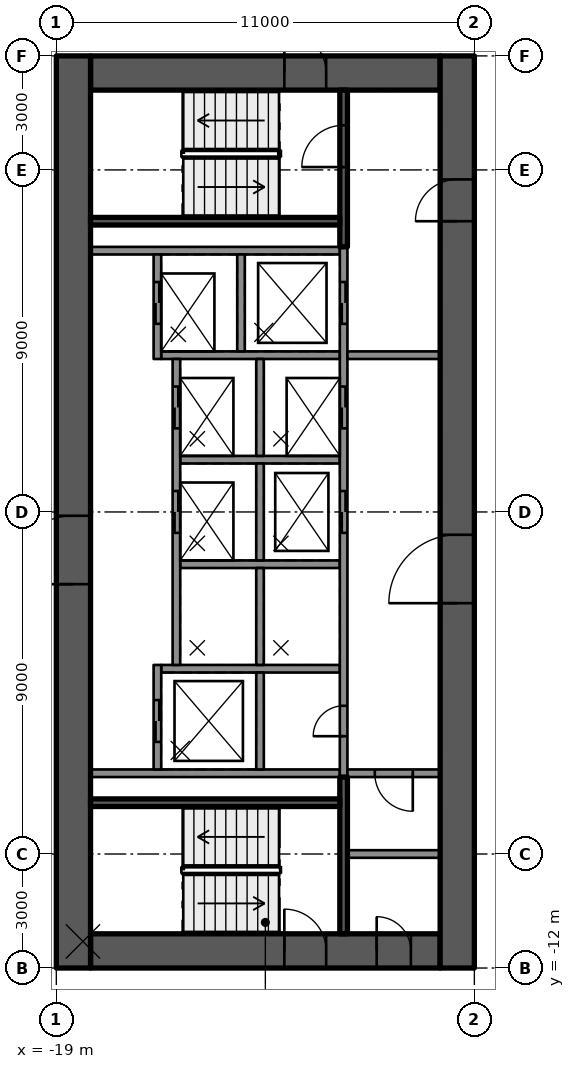
"""IFC4 building model, lengths in metres.
Left out: names, types, materials, properties, quantities, classifications, styles, units other than length and angle.
Written with IfcOpenShell. Run it as: python <this file> out.ifc"""

import sys

from ifc_helpers import new_model, si_unit, direction, frame, frame_2d, origin, place, context, subcontext, project, spatial, rectangle, extrude, element, fill, save


model = new_model("IFC4")
c1 = context("Model", 3, precision=1e-05, world=origin(), true_north=direction((0.0, 1.0)))
c2 = subcontext(c1, "Body", "Model", "MODEL_VIEW")
j1 = project(units=[si_unit("LENGTHUNIT", "METRE"), si_unit("PLANEANGLEUNIT", "RADIAN")], contexts=[c1])
p1 = place(None, origin())
s1 = spatial("IfcSite", under=j1, at=p1, CompositionType="ELEMENT")
p2 = place(p1, origin())
s2 = spatial("IfcBuilding", under=s1, at=p2, CompositionType="ELEMENT")
p3 = place(p2, frame((0.0, 0.0, 105.7)))
s3 = spatial("IfcBuildingStorey", under=s2, at=p3, CompositionType="ELEMENT", Elevation=105.7)
p4 = place(p3, frame((-18.1, 11.55, 0.0), z_axis=(0.0, 0.0, 1.0), x_axis=(1.0, 0.0, 0.0)))
e1 = element("IfcWall", 1, at=p4, inside=s3, PredefinedType="SHEAR", context=c2, shape_type="SweptSolid", body=[
    extrude(rectangle(XDim=9.2, YDim=0.9, at=frame_2d((4.6, 0.0))), origin(), (0.0, 0.0, 1.0), 3.5),
])
p5 = place(p4, frame((5.1, 0.0, 0.0)))
e2 = element("IfcOpeningElement", 2, at=p5, cuts=e1, PredefinedType="OPENING", context=c2, shape_type="SweptSolid", body=[
    extrude(rectangle(XDim=1.1, YDim=2.1, at=frame_2d((0.55, 1.05))), frame((0.0, 0.46, 0.0), z_axis=(0.0, -1.0, 0.0), x_axis=(1.0, 0.0, 0.0)), (0.0, 0.0, 1.0), 0.92),
])
p6 = place(p3, frame((-18.1, -11.55, 0.0), z_axis=(0.0, 0.0, 1.0), x_axis=(1.0, 0.0, 0.0)))
e3 = element("IfcWall", 3, at=p6, inside=s3, PredefinedType="SHEAR", context=c2, shape_type="SweptSolid", body=[
    extrude(rectangle(XDim=9.2, YDim=0.9, at=frame_2d((4.6, 0.0))), origin(), (0.0, 0.0, 1.0), 3.5),
])
p7 = place(p6, frame((5.1, 0.0, 0.0)))
e4 = element("IfcOpeningElement", 4, at=p7, cuts=e3, PredefinedType="OPENING", context=c2, shape_type="SweptSolid", body=[
    extrude(rectangle(XDim=1.1, YDim=2.1, at=frame_2d((0.55, 1.05))), frame((0.0, 0.46, 0.0), z_axis=(0.0, -1.0, 0.0), x_axis=(1.0, 0.0, 0.0)), (0.0, 0.0, 1.0), 0.92),
])
p8 = place(p6, frame((7.53, 0.0, 0.0)))
e5 = element("IfcOpeningElement", 5, at=p8, cuts=e3, PredefinedType="OPENING", context=c2, shape_type="SweptSolid", body=[
    extrude(rectangle(XDim=0.9, YDim=2.1, at=frame_2d((0.45, 1.05))), frame((0.0, 0.46, 0.0), z_axis=(0.0, -1.0, 0.0), x_axis=(1.0, 0.0, 0.0)), (0.0, 0.0, 1.0), 0.92),
])
p9 = place(p3, frame((-18.55, -12.0, 0.0), z_axis=(0.0, 0.0, 1.0), x_axis=(0.0, 1.0, 0.0)))
e6 = element("IfcWall", 6, at=p9, inside=s3, PredefinedType="SHEAR", context=c2, shape_type="SweptSolid", body=[
    extrude(rectangle(XDim=24.0, YDim=0.9, at=frame_2d((12.0, 0.0))), origin(), (0.0, 0.0, 1.0), 3.5),
])
p10 = place(p9, frame((10.1, 0.0, 0.0)))
e7 = element("IfcOpeningElement", 7, at=p10, cuts=e6, PredefinedType="OPENING", context=c2, shape_type="SweptSolid", body=[
    extrude(rectangle(XDim=1.8, YDim=2.1, at=frame_2d((0.9, 1.05))), frame((0.0, 0.46, 0.0), z_axis=(0.0, -1.0, 0.0), x_axis=(1.0, 0.0, 0.0)), (0.0, 0.0, 1.0), 0.92),
])
p11 = place(p3, frame((-8.45, -12.0, 0.0), z_axis=(0.0, 0.0, 1.0), x_axis=(0.0, 1.0, 0.0)))
e8 = element("IfcWall", 8, at=p11, inside=s3, PredefinedType="SHEAR", context=c2, shape_type="SweptSolid", body=[
    extrude(rectangle(XDim=24.0, YDim=0.9, at=frame_2d((12.0, 0.0))), origin(), (0.0, 0.0, 1.0), 3.5),
])
p12 = place(p11, frame((9.6, 0.0, 0.0)))
e9 = element("IfcOpeningElement", 9, at=p12, cuts=e8, PredefinedType="OPENING", context=c2, shape_type="SweptSolid", body=[
    extrude(rectangle(XDim=1.8, YDim=2.1, at=frame_2d((0.9, 1.05))), frame((0.0, 0.46, 0.0), z_axis=(0.0, -1.0, 0.0), x_axis=(1.0, 0.0, 0.0)), (0.0, 0.0, 1.0), 0.92),
])
p13 = place(p11, frame((19.65, 0.0, 0.0)))
e10 = element("IfcOpeningElement", 10, at=p13, cuts=e8, PredefinedType="OPENING", context=c2, shape_type="SweptSolid", body=[
    extrude(rectangle(XDim=1.1, YDim=2.1, at=frame_2d((0.55, 1.05))), frame((0.0, 0.46, 0.0), z_axis=(0.0, -1.0, 0.0), x_axis=(1.0, 0.0, 0.0)), (0.0, 0.0, 1.0), 0.92),
])
for number, where, z_axis, x_axis in (
    (11, (-11.54, 6.875, 0.0), (0.0, 0.0, 1.0), (-1.0, 0.0, 0.0)),
    (12, (-11.54, -6.875, 0.0), (0.0, 0.0, 1.0), (-1.0, 0.0, 0.0)),
):
    element("IfcWall", number, at=place(p3, frame(where, z_axis=z_axis, x_axis=x_axis)), inside=s3, PredefinedType="SOLIDWALL", context=c2, shape_type="SweptSolid", body=[
        extrude(rectangle(XDim=6.56, YDim=0.2, at=frame_2d((3.28, 0.0))), origin(), (0.0, 0.0, 1.0), 3.09),
    ])
p14 = place(p3, frame((-11.54, -4.125, 0.0), z_axis=(0.0, 0.0, 1.0), x_axis=(-1.0, 0.0, 0.0)))
e13 = element("IfcWall", 13, at=p14, inside=s3, PredefinedType="SOLIDWALL", context=c2, shape_type="SweptSolid", body=[
    extrude(rectangle(XDim=4.7, YDim=0.2, at=frame_2d((2.35, 0.0))), origin(), (0.0, 0.0, 1.0), 3.09),
])
for number, where, z_axis, x_axis in (
    (14, (-11.54, -1.375, 0.0), (0.0, 0.0, 1.0), (-1.0, 0.0, 0.0)),
    (15, (-11.54, 1.375, 0.0), (0.0, 0.0, 1.0), (-1.0, 0.0, 0.0)),
):
    element("IfcWall", number, at=place(p3, frame(where, z_axis=z_axis, x_axis=x_axis)), inside=s3, PredefinedType="SOLIDWALL", context=c2, shape_type="SweptSolid", body=[
        extrude(rectangle(XDim=4.2, YDim=0.2, at=frame_2d((2.1, 0.0))), origin(), (0.0, 0.0, 1.0), 3.09),
    ])
p15 = place(p3, frame((-11.54, 4.125, 0.0), z_axis=(0.0, 0.0, 1.0), x_axis=(-1.0, 0.0, 0.0)))
e16 = element("IfcWall", 16, at=p15, inside=s3, PredefinedType="SOLIDWALL", context=c2, shape_type="SweptSolid", body=[
    extrude(rectangle(XDim=4.7, YDim=0.2, at=frame_2d((2.35, 0.0))), origin(), (0.0, 0.0, 1.0), 3.09),
])
p16 = place(p3, frame((-11.44, -6.975, 0.0), z_axis=(0.0, 0.0, 1.0), x_axis=(0.0, 1.0, 0.0)))
e17 = element("IfcWall", 17, at=p16, inside=s3, PredefinedType="SOLIDWALL", context=c2, shape_type="SweptSolid", body=[
    extrude(rectangle(XDim=13.95, YDim=0.2, at=frame_2d((6.975, 0.0))), origin(), (0.0, 0.0, 1.0), 3.09),
])
p17 = place(p16, frame((6.425, 0.0, 0.0)))
e18 = element("IfcOpeningElement", 18, at=p17, cuts=e17, PredefinedType="OPENING", context=c2, shape_type="SweptSolid", body=[
    extrude(rectangle(XDim=1.1, YDim=2.1, at=frame_2d((0.55, 1.05))), frame((0.0, 0.11, 0.0), z_axis=(0.0, -1.0, 0.0), x_axis=(1.0, 0.0, 0.0)), (0.0, 0.0, 1.0), 0.22),
])
p18 = place(p16, frame((9.175, 0.0, 0.0)))
e19 = element("IfcOpeningElement", 19, at=p18, cuts=e17, PredefinedType="OPENING", context=c2, shape_type="SweptSolid", body=[
    extrude(rectangle(XDim=1.1, YDim=2.1, at=frame_2d((0.55, 1.05))), frame((0.0, 0.11, 0.0), z_axis=(0.0, -1.0, 0.0), x_axis=(1.0, 0.0, 0.0)), (0.0, 0.0, 1.0), 0.22),
])
p19 = place(p16, frame((11.925, 0.0, 0.0)))
e20 = element("IfcOpeningElement", 20, at=p19, cuts=e17, PredefinedType="OPENING", context=c2, shape_type="SweptSolid", body=[
    extrude(rectangle(XDim=1.1, YDim=2.1, at=frame_2d((0.55, 1.05))), frame((0.0, 0.11, 0.0), z_axis=(0.0, -1.0, 0.0), x_axis=(1.0, 0.0, 0.0)), (0.0, 0.0, 1.0), 0.22),
])
p20 = place(p16, frame((1.075, 0.0, 0.0)))
e21 = element("IfcOpeningElement", 21, at=p20, cuts=e17, PredefinedType="OPENING", context=c2, shape_type="SweptSolid", body=[
    extrude(rectangle(XDim=0.8, YDim=2.1, at=frame_2d((0.4, 1.05))), frame((0.0, 0.11, 0.0), z_axis=(0.0, -1.0, 0.0), x_axis=(1.0, 0.0, 0.0)), (0.0, 0.0, 1.0), 0.22),
])
for number, where, z_axis, x_axis in (
    (22, (-13.64, -6.775, 0.0), (0.0, 0.0, 1.0), (0.0, 1.0, 0.0)),
    (23, (-13.64, -4.025, 0.0), (0.0, 0.0, 1.0), (0.0, 1.0, 0.0)),
    (24, (-13.64, -1.275, 0.0), (0.0, 0.0, 1.0), (0.0, 1.0, 0.0)),
    (25, (-13.64, 1.475, 0.0), (0.0, 0.0, 1.0), (0.0, 1.0, 0.0)),
    (26, (-14.14, 4.225, 0.0), (0.0, 0.0, 1.0), (0.0, 1.0, 0.0)),
):
    element("IfcWall", number, at=place(p3, frame(where, z_axis=z_axis, x_axis=x_axis)), inside=s3, PredefinedType="SOLIDWALL", context=c2, shape_type="SweptSolid", body=[
        extrude(rectangle(XDim=2.55, YDim=0.2, at=frame_2d((1.275, 0.0))), origin(), (0.0, 0.0, 1.0), 3.09),
    ])
p21 = place(p3, frame((-16.34, -6.775, 0.0), z_axis=(0.0, 0.0, 1.0), x_axis=(0.0, 1.0, 0.0)))
e27 = element("IfcWall", 27, at=p21, inside=s3, PredefinedType="SOLIDWALL", context=c2, shape_type="SweptSolid", body=[
    extrude(rectangle(XDim=2.75, YDim=0.2, at=frame_2d((1.375, 0.0))), origin(), (0.0, 0.0, 1.0), 3.09),
])
p22 = place(p21, frame((0.725, 0.0, 0.0)))
e28 = element("IfcOpeningElement", 28, at=p22, cuts=e27, PredefinedType="OPENING", context=c2, shape_type="SweptSolid", body=[
    extrude(rectangle(XDim=1.1, YDim=2.1, at=frame_2d((0.55, 1.05))), frame((0.0, 0.11, 0.0), z_axis=(0.0, -1.0, 0.0), x_axis=(1.0, 0.0, 0.0)), (0.0, 0.0, 1.0), 0.22),
])
p23 = place(p3, frame((-15.84, -4.025, 0.0), z_axis=(0.0, 0.0, 1.0), x_axis=(0.0, 1.0, 0.0)))
e29 = element("IfcWall", 29, at=p23, inside=s3, PredefinedType="SOLIDWALL", context=c2, shape_type="SweptSolid", body=[
    extrude(rectangle(XDim=8.05, YDim=0.2, at=frame_2d((4.025, 0.0))), origin(), (0.0, 0.0, 1.0), 3.09),
])
p24 = place(p23, frame((3.475, 0.0, 0.0)))
e30 = element("IfcOpeningElement", 30, at=p24, cuts=e29, PredefinedType="OPENING", context=c2, shape_type="SweptSolid", body=[
    extrude(rectangle(XDim=1.1, YDim=2.1, at=frame_2d((0.55, 1.05))), frame((0.0, 0.11, 0.0), z_axis=(0.0, -1.0, 0.0), x_axis=(1.0, 0.0, 0.0)), (0.0, 0.0, 1.0), 0.22),
])
p25 = place(p23, frame((6.225, 0.0, 0.0)))
e31 = element("IfcOpeningElement", 31, at=p25, cuts=e29, PredefinedType="OPENING", context=c2, shape_type="SweptSolid", body=[
    extrude(rectangle(XDim=1.1, YDim=2.1, at=frame_2d((0.55, 1.05))), frame((0.0, 0.11, 0.0), z_axis=(0.0, -1.0, 0.0), x_axis=(1.0, 0.0, 0.0)), (0.0, 0.0, 1.0), 0.22),
])
p26 = place(p3, frame((-16.34, 4.025, 0.0), z_axis=(0.0, 0.0, 1.0), x_axis=(0.0, 1.0, 0.0)))
e32 = element("IfcWall", 32, at=p26, inside=s3, PredefinedType="SOLIDWALL", context=c2, shape_type="SweptSolid", body=[
    extrude(rectangle(XDim=2.75, YDim=0.2, at=frame_2d((1.375, 0.0))), origin(), (0.0, 0.0, 1.0), 3.09),
])
p27 = place(p26, frame((0.925, 0.0, 0.0)))
e33 = element("IfcOpeningElement", 33, at=p27, cuts=e32, PredefinedType="OPENING", context=c2, shape_type="SweptSolid", body=[
    extrude(rectangle(XDim=1.1, YDim=2.1, at=frame_2d((0.55, 1.05))), frame((0.0, 0.11, 0.0), z_axis=(0.0, -1.0, 0.0), x_axis=(1.0, 0.0, 0.0)), (0.0, 0.0, 1.0), 0.22),
])
p28 = place(p3, frame((-11.44, 6.975, 0.0), z_axis=(0.0, 0.0, 1.0), x_axis=(0.0, 1.0, 0.0)))
e34 = element("IfcWall", 34, at=p28, inside=s3, PredefinedType="SOLIDWALL", context=c2, shape_type="SweptSolid", body=[
    extrude(rectangle(XDim=4.125, YDim=0.2, at=frame_2d((2.062, 0.0))), origin(), (0.0, 0.0, 1.0), 3.09),
])
p29 = place(p28, frame((2.1, 0.0, 0.0)))
e35 = element("IfcOpeningElement", 35, at=p29, cuts=e34, PredefinedType="OPENING", context=c2, shape_type="SweptSolid", body=[
    extrude(rectangle(XDim=1.1, YDim=2.1, at=frame_2d((0.55, 1.05))), frame((0.0, 0.11, 0.0), z_axis=(0.0, -1.0, 0.0), x_axis=(1.0, 0.0, 0.0)), (0.0, 0.0, 1.0), 0.22),
])
p30 = place(p3, frame((-11.54, 7.65, 0.0), z_axis=(0.0, 0.0, 1.0), x_axis=(-1.0, 0.0, 0.0)))
e36 = element("IfcWall", 36, at=p30, inside=s3, PredefinedType="SOLIDWALL", context=c2, shape_type="SweptSolid", body=[
    extrude(rectangle(XDim=6.56, YDim=0.2, at=frame_2d((3.28, 0.0))), origin(), (0.0, 0.0, 1.0), 3.09),
])
p31 = place(p3, frame((-11.44, -11.1, 0.0), z_axis=(0.0, 0.0, 1.0), x_axis=(0.0, 1.0, 0.0)))
e37 = element("IfcWall", 37, at=p31, inside=s3, PredefinedType="SOLIDWALL", context=c2, shape_type="SweptSolid", body=[
    extrude(rectangle(XDim=4.125, YDim=0.2, at=frame_2d((2.062, 0.0))), origin(), (0.0, 0.0, 1.0), 3.09),
])
p32 = place(p3, frame((-11.54, -7.65, 0.0), z_axis=(0.0, 0.0, 1.0), x_axis=(-1.0, 0.0, 0.0)))
e38 = element("IfcWall", 38, at=p32, inside=s3, PredefinedType="SOLIDWALL", context=c2, shape_type="SweptSolid", body=[
    extrude(rectangle(XDim=6.56, YDim=0.2, at=frame_2d((3.28, 0.0))), origin(), (0.0, 0.0, 1.0), 3.09),
])
p33 = place(p3, frame((-8.9, 4.125, 0.0), z_axis=(0.0, 0.0, 1.0), x_axis=(-1.0, 0.0, 0.0)))
e39 = element("IfcWall", 39, at=p33, inside=s3, PredefinedType="PARTITIONING", context=c2, shape_type="SweptSolid", body=[
    extrude(rectangle(XDim=2.44, YDim=0.2, at=frame_2d((1.22, 0.0))), origin(), (0.0, 0.0, 1.0), 3.09),
])
p34 = place(p3, frame((-8.9, -6.875, 0.0), z_axis=(0.0, 0.0, 1.0), x_axis=(-1.0, 0.0, 0.0)))
e40 = element("IfcWall", 40, at=p34, inside=s3, PredefinedType="PARTITIONING", context=c2, shape_type="SweptSolid", body=[
    extrude(rectangle(XDim=2.44, YDim=0.2, at=frame_2d((1.22, 0.0))), origin(), (0.0, 0.0, 1.0), 3.09),
])
p35 = place(p34, frame((0.72, 0.0, 0.0)))
e41 = element("IfcOpeningElement", 41, at=p35, cuts=e40, PredefinedType="OPENING", context=c2, shape_type="SweptSolid", body=[
    extrude(rectangle(XDim=1.0, YDim=2.1, at=frame_2d((0.5, 1.05))), frame((0.0, 0.11, 0.0), z_axis=(0.0, -1.0, 0.0), x_axis=(1.0, 0.0, 0.0)), (0.0, 0.0, 1.0), 0.22),
])
p36 = place(p3, frame((-8.9, -9.0, 0.0), z_axis=(0.0, 0.0, 1.0), x_axis=(-1.0, 0.0, 0.0)))
e42 = element("IfcWall", 42, at=p36, inside=s3, PredefinedType="PARTITIONING", context=c2, shape_type="SweptSolid", body=[
    extrude(rectangle(XDim=2.44, YDim=0.2, at=frame_2d((1.22, 0.0))), origin(), (0.0, 0.0, 1.0), 3.09),
])
p37 = place(p22, origin())
e43 = element("IfcDoor", 43, at=p37, inside=s3, OperationType="DOUBLE_DOOR_SLIDING", PredefinedType="DOOR", context=c2, shape_type="SweptSolid", body=[
    extrude(rectangle(XDim=1.1, YDim=2.1, at=frame_2d((0.55, 1.05))), frame((0.0, 0.025, 0.0), z_axis=(0.0, -1.0, 0.0), x_axis=(1.0, 0.0, 0.0)), (0.0, 0.0, 1.0), 0.05),
])
fill(e28, e43)
p38 = place(p17, origin())
e44 = element("IfcDoor", 44, at=p38, inside=s3, OperationType="DOUBLE_DOOR_SLIDING", PredefinedType="DOOR", context=c2, shape_type="SweptSolid", body=[
    extrude(rectangle(XDim=1.1, YDim=2.1, at=frame_2d((0.55, 1.05))), frame((0.0, 0.025, 0.0), z_axis=(0.0, -1.0, 0.0), x_axis=(1.0, 0.0, 0.0)), (0.0, 0.0, 1.0), 0.05),
])
fill(e18, e44)
p39 = place(p24, origin())
e45 = element("IfcDoor", 45, at=p39, inside=s3, OperationType="DOUBLE_DOOR_SLIDING", PredefinedType="DOOR", context=c2, shape_type="SweptSolid", body=[
    extrude(rectangle(XDim=1.1, YDim=2.1, at=frame_2d((0.55, 1.05))), frame((0.0, 0.025, 0.0), z_axis=(0.0, -1.0, 0.0), x_axis=(1.0, 0.0, 0.0)), (0.0, 0.0, 1.0), 0.05),
])
fill(e30, e45)
p40 = place(p18, origin())
e46 = element("IfcDoor", 46, at=p40, inside=s3, OperationType="DOUBLE_DOOR_SLIDING", PredefinedType="DOOR", context=c2, shape_type="SweptSolid", body=[
    extrude(rectangle(XDim=1.1, YDim=2.1, at=frame_2d((0.55, 1.05))), frame((0.0, 0.025, 0.0), z_axis=(0.0, -1.0, 0.0), x_axis=(1.0, 0.0, 0.0)), (0.0, 0.0, 1.0), 0.05),
])
fill(e19, e46)
p41 = place(p25, origin())
e47 = element("IfcDoor", 47, at=p41, inside=s3, OperationType="DOUBLE_DOOR_SLIDING", PredefinedType="DOOR", context=c2, shape_type="SweptSolid", body=[
    extrude(rectangle(XDim=1.1, YDim=2.1, at=frame_2d((0.55, 1.05))), frame((0.0, 0.025, 0.0), z_axis=(0.0, -1.0, 0.0), x_axis=(1.0, 0.0, 0.0)), (0.0, 0.0, 1.0), 0.05),
])
fill(e31, e47)
p42 = place(p19, origin())
e48 = element("IfcDoor", 48, at=p42, inside=s3, OperationType="DOUBLE_DOOR_SLIDING", PredefinedType="DOOR", context=c2, shape_type="SweptSolid", body=[
    extrude(rectangle(XDim=1.1, YDim=2.1, at=frame_2d((0.55, 1.05))), frame((0.0, 0.025, 0.0), z_axis=(0.0, -1.0, 0.0), x_axis=(1.0, 0.0, 0.0)), (0.0, 0.0, 1.0), 0.05),
])
fill(e20, e48)
p43 = place(p27, origin())
e49 = element("IfcDoor", 49, at=p43, inside=s3, OperationType="DOUBLE_DOOR_SLIDING", PredefinedType="DOOR", context=c2, shape_type="SweptSolid", body=[
    extrude(rectangle(XDim=1.1, YDim=2.1, at=frame_2d((0.55, 1.05))), frame((0.0, 0.025, 0.0), z_axis=(0.0, -1.0, 0.0), x_axis=(1.0, 0.0, 0.0)), (0.0, 0.0, 1.0), 0.05),
])
fill(e33, e49)
p44 = place(p20, origin())
e50 = element("IfcDoor", 50, at=p44, inside=s3, OperationType="SINGLE_SWING_LEFT", PredefinedType="DOOR", context=c2, shape_type="SweptSolid", body=[
    extrude(rectangle(XDim=0.8, YDim=2.1, at=frame_2d((0.4, 1.05))), frame((0.0, 0.025, 0.0), z_axis=(0.0, -1.0, 0.0), x_axis=(1.0, 0.0, 0.0)), (0.0, 0.0, 1.0), 0.05),
])
fill(e21, e50)
p45 = place(p12, origin())
e51 = element("IfcDoor", 51, at=p45, inside=s3, OperationType="SINGLE_SWING_LEFT", PredefinedType="DOOR", context=c2, shape_type="SweptSolid", body=[
    extrude(rectangle(XDim=1.8, YDim=2.1, at=frame_2d((0.9, 1.05))), frame((0.0, 0.025, 0.0), z_axis=(0.0, -1.0, 0.0), x_axis=(1.0, 0.0, 0.0)), (0.0, 0.0, 1.0), 0.05),
])
fill(e9, e51)
p46 = place(p10, origin())
e52 = element("IfcDoor", 52, at=p46, inside=s3, OperationType="SINGLE_SWING_LEFT", PredefinedType="DOOR", context=c2, shape_type="SweptSolid", body=[
    extrude(rectangle(XDim=1.8, YDim=2.1, at=frame_2d((0.9, 1.05))), frame((0.0, 0.025, 0.0), z_axis=(0.0, -1.0, 0.0), x_axis=(1.0, 0.0, 0.0)), (0.0, 0.0, 1.0), 0.05),
])
fill(e7, e52)
p47 = place(p13, origin())
e53 = element("IfcDoor", 53, at=p47, inside=s3, OperationType="SINGLE_SWING_RIGHT", PredefinedType="DOOR", context=c2, shape_type="SweptSolid", body=[
    extrude(rectangle(XDim=1.1, YDim=2.1, at=frame_2d((0.55, 1.05))), frame((0.0, 0.025, 0.0), z_axis=(0.0, -1.0, 0.0), x_axis=(1.0, 0.0, 0.0)), (0.0, 0.0, 1.0), 0.05),
])
fill(e10, e53)
p48 = place(p5, origin())
e54 = element("IfcDoor", 54, at=p48, inside=s3, OperationType="SINGLE_SWING_RIGHT", PredefinedType="DOOR", context=c2, shape_type="SweptSolid", body=[
    extrude(rectangle(XDim=1.1, YDim=2.1, at=frame_2d((0.55, 1.05))), frame((0.0, 0.025, 0.0), z_axis=(0.0, -1.0, 0.0), x_axis=(1.0, 0.0, 0.0)), (0.0, 0.0, 1.0), 0.05),
])
fill(e2, e54)
p49 = place(p7, origin())
e55 = element("IfcDoor", 55, at=p49, inside=s3, OperationType="SINGLE_SWING_RIGHT", PredefinedType="DOOR", context=c2, shape_type="SweptSolid", body=[
    extrude(rectangle(XDim=1.1, YDim=2.1, at=frame_2d((0.55, 1.05))), frame((0.0, 0.025, 0.0), z_axis=(0.0, -1.0, 0.0), x_axis=(1.0, 0.0, 0.0)), (0.0, 0.0, 1.0), 0.05),
])
fill(e4, e55)
p50 = place(p29, origin())
e56 = element("IfcDoor", 56, at=p50, inside=s3, OperationType="SINGLE_SWING_RIGHT", PredefinedType="DOOR", context=c2, shape_type="SweptSolid", body=[
    extrude(rectangle(XDim=1.1, YDim=2.1, at=frame_2d((0.55, 1.05))), frame((0.0, 0.025, 0.0), z_axis=(0.0, -1.0, 0.0), x_axis=(1.0, 0.0, 0.0)), (0.0, 0.0, 1.0), 0.05),
])
fill(e35, e56)
p51 = place(p8, origin())
e57 = element("IfcDoor", 57, at=p51, inside=s3, OperationType="SINGLE_SWING_RIGHT", PredefinedType="DOOR", context=c2, shape_type="SweptSolid", body=[
    extrude(rectangle(XDim=0.9, YDim=2.1, at=frame_2d((0.45, 1.05))), frame((0.0, 0.025, 0.0), z_axis=(0.0, -1.0, 0.0), x_axis=(1.0, 0.0, 0.0)), (0.0, 0.0, 1.0), 0.05),
])
fill(e5, e57)
p52 = place(p35, origin())
e58 = element("IfcDoor", 58, at=p52, inside=s3, OperationType="SINGLE_SWING_RIGHT", PredefinedType="DOOR", context=c2, shape_type="SweptSolid", body=[
    extrude(rectangle(XDim=1.0, YDim=2.1, at=frame_2d((0.5, 1.05))), frame((0.0, 0.025, 0.0), z_axis=(0.0, -1.0, 0.0), x_axis=(1.0, 0.0, 0.0)), (0.0, 0.0, 1.0), 0.05),
])
fill(e41, e58)
save(model, sys.argv[1])
